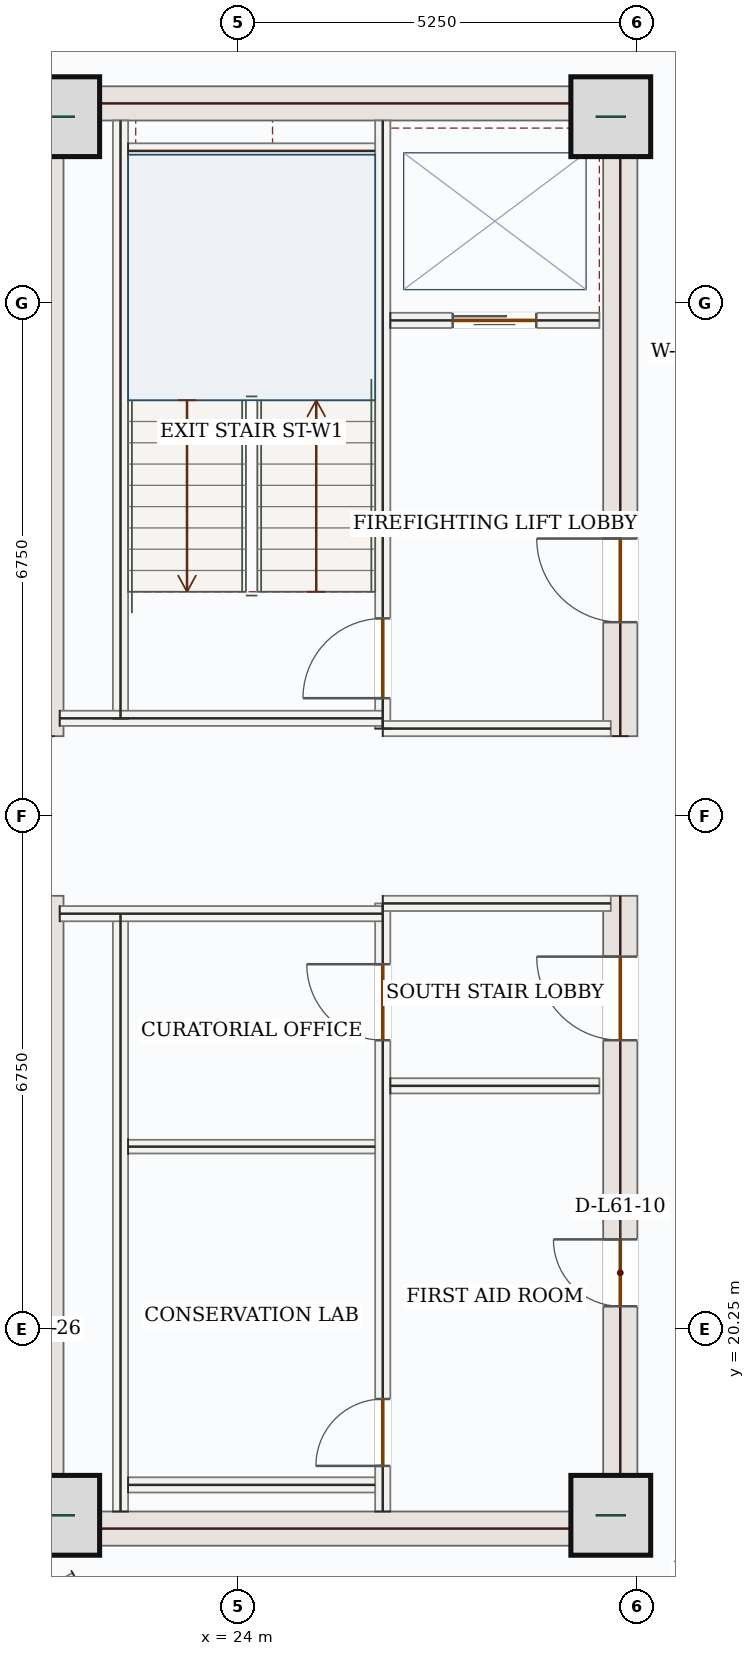
"""IFC4 building model, lengths in metres.
Left out: names, types, materials, properties, quantities, classifications, styles, units other than length and angle.
Written with IfcOpenShell. Run it as: python <this file> out.ifc"""

import sys

from ifc_helpers import new_model, si_unit, direction, frame, frame_2d, origin, origin_2d, place, context, subcontext, project, spatial, rectangle, extrude, source, transform, mapped, element, fill, save


model = new_model("IFC4")
c1 = context("Model", 3, precision=1e-05, world=origin(), true_north=direction((0.0, 1.0)))
c2 = subcontext(c1, "Body", "Model", "MODEL_VIEW")
j1 = project(units=[si_unit("LENGTHUNIT", "METRE"), si_unit("PLANEANGLEUNIT", "RADIAN")], contexts=[c1])
p1 = place(None, origin())
s1 = spatial("IfcSite", under=j1, at=p1, CompositionType="ELEMENT")
p2 = place(p1, origin())
s2 = spatial("IfcBuilding", under=s1, at=p2, CompositionType="ELEMENT")
p3 = place(p2, frame((0.0, 0.0, 257.85)))
s3 = spatial("IfcBuildingStorey", under=s2, at=p3, CompositionType="ELEMENT", Elevation=257.85)
m1 = source(origin(), c2, "Body", "SweptSolid", [
    extrude(rectangle(XDim=8.55, YDim=0.45, at=frame_2d((4.275, 0.0))), origin(), (0.0, 0.0, 1.0), 3.5),
])
for number, where, z_axis, x_axis in (
    (1, (21.475, 17.4, 0.0), (0.0, 0.0, 1.0), (0.0, 1.0, 0.0)),
    (2, (21.475, 28.05, 0.0), (0.0, 0.0, 1.0), (0.0, 1.0, 0.0)),
):
    element("IfcWall", number, at=place(p3, frame(where, z_axis=z_axis, x_axis=x_axis)), inside=s3, PredefinedType="SHEAR", context=c2, shape_type="MappedRepresentation", body=[
        mapped(m1, transform((0.0, 0.0, 0.0), x_axis=(1.0, 0.0, 0.0), y_axis=(0.0, 1.0, 0.0), z_axis=(0.0, 0.0, 1.0), scale=1.0)),
    ])
p4 = place(p3, frame((29.025, 17.4, 0.0), z_axis=(0.0, 0.0, 1.0), x_axis=(0.0, 1.0, 0.0)))
e3 = element("IfcWall", 3, at=p4, inside=s3, PredefinedType="SHEAR", context=c2, shape_type="SweptSolid", body=[
    extrude(rectangle(XDim=8.55, YDim=0.45, at=frame_2d((4.275, 0.0))), origin(), (0.0, 0.0, 1.0), 3.5),
])
p5 = place(p4, frame((6.65, 0.0, 0.0)))
e4 = element("IfcOpeningElement", 4, at=p5, cuts=e3, PredefinedType="OPENING", context=c2, shape_type="SweptSolid", body=[
    extrude(rectangle(XDim=1.1, YDim=2.2, at=frame_2d((0.55, 1.1))), frame((0.0, 0.235, 0.0), z_axis=(0.0, -1.0, 0.0), x_axis=(1.0, 0.0, 0.0)), (0.0, 0.0, 1.0), 0.47),
])
p6 = place(p4, frame((3.15, 0.0, 0.0)))
e5 = element("IfcOpeningElement", 5, at=p6, cuts=e3, PredefinedType="OPENING", context=c2, shape_type="SweptSolid", body=[
    extrude(rectangle(XDim=0.88, YDim=2.1, at=frame_2d((0.44, 1.05))), frame((0.0, 0.235, 0.0), z_axis=(0.0, -1.0, 0.0), x_axis=(1.0, 0.0, 0.0)), (0.0, 0.0, 1.0), 0.47),
])
p7 = place(p3, frame((29.025, 28.05, 0.0), z_axis=(0.0, 0.0, 1.0), x_axis=(0.0, 1.0, 0.0)))
e6 = element("IfcWall", 6, at=p7, inside=s3, PredefinedType="SHEAR", context=c2, shape_type="SweptSolid", body=[
    extrude(rectangle(XDim=8.55, YDim=0.45, at=frame_2d((4.275, 0.0))), origin(), (0.0, 0.0, 1.0), 3.5),
])
p8 = place(p7, frame((1.5, 0.0, 0.0)))
e7 = element("IfcOpeningElement", 7, at=p8, cuts=e6, PredefinedType="OPENING", context=c2, shape_type="SweptSolid", body=[
    extrude(rectangle(XDim=1.1, YDim=2.2, at=frame_2d((0.55, 1.1))), frame((0.0, 0.235, 0.0), z_axis=(0.0, -1.0, 0.0), x_axis=(1.0, 0.0, 0.0)), (0.0, 0.0, 1.0), 0.47),
])
m2 = source(origin(), c2, "Body", "SweptSolid", [
    extrude(rectangle(XDim=7.1, YDim=0.45, at=frame_2d((3.55, 0.0))), origin(), (0.0, 0.0, 1.0), 3.5),
])
for number, where, z_axis, x_axis in (
    (8, (21.7, 17.625, 0.0), (0.0, 0.0, 1.0), (1.0, 0.0, 0.0)),
    (9, (21.7, 36.375, 0.0), (0.0, 0.0, 1.0), (1.0, 0.0, 0.0)),
):
    element("IfcWall", number, at=place(p3, frame(where, z_axis=z_axis, x_axis=x_axis)), inside=s3, PredefinedType="SHEAR", context=c2, shape_type="MappedRepresentation", body=[
        mapped(m2, transform((0.0, 0.0, 0.0), x_axis=(1.0, 0.0, 0.0), y_axis=(0.0, 1.0, 0.0), z_axis=(0.0, 0.0, 1.0), scale=1.0)),
    ])
m3 = source(origin(), c2, "Body", "SweptSolid", [
    extrude(rectangle(XDim=1.05, YDim=1.05, at=origin_2d()), origin(), (0.0, 0.0, 1.0), 3.75),
])
for number, where, z_axis, x_axis in (
    (10, (21.65, 17.8, 0.0), (0.0, 0.0, 1.0), (1.0, 0.0, 0.0)),
    (11, (28.9, 17.8, 0.0), (0.0, 0.0, 1.0), (1.0, 0.0, 0.0)),
    (12, (21.65, 36.2, 0.0), (0.0, 0.0, 1.0), (1.0, 0.0, 0.0)),
    (13, (28.9, 36.2, 0.0), (0.0, 0.0, 1.0), (1.0, 0.0, 0.0)),
):
    element("IfcColumn", number, at=place(p3, frame(where, z_axis=z_axis, x_axis=x_axis)), inside=s3, PredefinedType="COLUMN", context=c2, shape_type="MappedRepresentation", body=[
        mapped(m3, transform((0.0, 0.0, 0.0), x_axis=(1.0, 0.0, 0.0), y_axis=(0.0, 1.0, 0.0), z_axis=(0.0, 0.0, 1.0), scale=1.0)),
    ])
m4 = source(origin(), c2, "Body", "SweptSolid", [
    extrude(rectangle(XDim=4.394, YDim=0.28, at=frame_2d((2.197, 0.0))), origin(), (0.0, 0.0, 1.0), 3.5),
])
p9 = place(p3, frame((18.94, 35.542, 0.0), z_axis=(0.0, 0.0, 1.0), x_axis=(0.707106781187, 0.707106781187, 0.0)))
e14 = element("IfcWall", 14, at=p9, inside=s3, PredefinedType="SOLIDWALL", context=c2, shape_type="MappedRepresentation", body=[
    mapped(m4, transform((0.0, 0.0, 0.0), x_axis=(1.0, 0.0, 0.0), y_axis=(0.0, 1.0, 0.0), z_axis=(0.0, 0.0, 1.0), scale=1.0)),
])
m5 = source(origin(), c2, "Body", "SweptSolid", [
    extrude(rectangle(XDim=7.87, YDim=0.2, at=frame_2d((3.935, 0.0))), origin(), (0.0, 0.0, 1.0), 3.5),
])
for number, where, z_axis, x_axis in (
    (15, (22.45, 17.85, 0.0), (0.0, 0.0, 1.0), (0.0, 1.0, 0.0)),
    (16, (22.45, 28.28, 0.0), (0.0, 0.0, 1.0), (0.0, 1.0, 0.0)),
):
    element("IfcWall", number, at=place(p3, frame(where, z_axis=z_axis, x_axis=x_axis)), inside=s3, PredefinedType="SOLIDWALL", context=c2, shape_type="MappedRepresentation", body=[
        mapped(m5, transform((0.0, 0.0, 0.0), x_axis=(1.0, 0.0, 0.0), y_axis=(0.0, 1.0, 0.0), z_axis=(0.0, 0.0, 1.0), scale=1.0)),
    ])
p10 = place(p3, frame((25.9, 17.85, 0.0), z_axis=(0.0, 0.0, 1.0), x_axis=(0.0, 1.0, 0.0)))
e17 = element("IfcWall", 17, at=p10, inside=s3, PredefinedType="SOLIDWALL", context=c2, shape_type="SweptSolid", body=[
    extrude(rectangle(XDim=8.0, YDim=0.2, at=frame_2d((4.0, 0.0))), origin(), (0.0, 0.0, 1.0), 3.5),
])
p11 = place(p10, frame((6.2, 0.0, 0.0)))
e18 = element("IfcOpeningElement", 18, at=p11, cuts=e17, PredefinedType="OPENING", context=c2, shape_type="SweptSolid", body=[
    extrude(rectangle(XDim=1.0, YDim=2.15, at=frame_2d((0.5, 1.075))), frame((0.0, 0.11, 0.0), z_axis=(0.0, -1.0, 0.0), x_axis=(1.0, 0.0, 0.0)), (0.0, 0.0, 1.0), 0.22),
])
p12 = place(p10, frame((0.6, 0.0, 0.0)))
e19 = element("IfcOpeningElement", 19, at=p12, cuts=e17, PredefinedType="OPENING", context=c2, shape_type="SweptSolid", body=[
    extrude(rectangle(XDim=0.88, YDim=2.1, at=frame_2d((0.44, 1.05))), frame((0.0, 0.11, 0.0), z_axis=(0.0, -1.0, 0.0), x_axis=(1.0, 0.0, 0.0)), (0.0, 0.0, 1.0), 0.22),
])
p13 = place(p3, frame((25.9, 28.15, 0.0), z_axis=(0.0, 0.0, 1.0), x_axis=(0.0, 1.0, 0.0)))
e20 = element("IfcWall", 20, at=p13, inside=s3, PredefinedType="SOLIDWALL", context=c2, shape_type="SweptSolid", body=[
    extrude(rectangle(XDim=8.0, YDim=0.2, at=frame_2d((4.0, 0.0))), origin(), (0.0, 0.0, 1.0), 3.5),
])
p14 = place(p13, frame((0.4, 0.0, 0.0)))
e21 = element("IfcOpeningElement", 21, at=p14, cuts=e20, PredefinedType="OPENING", context=c2, shape_type="SweptSolid", body=[
    extrude(rectangle(XDim=1.05, YDim=2.15, at=frame_2d((0.525, 1.075))), frame((0.0, 0.11, 0.0), z_axis=(0.0, -1.0, 0.0), x_axis=(1.0, 0.0, 0.0)), (0.0, 0.0, 1.0), 0.22),
])
m6 = source(origin(), c2, "Body", "SweptSolid", [
    extrude(rectangle(XDim=4.25, YDim=0.2, at=frame_2d((2.125, 0.0))), origin(), (0.0, 0.0, 1.0), 3.5),
])
p15 = place(p3, frame((21.65, 25.715, 0.0), z_axis=(0.0, 0.0, 1.0), x_axis=(1.0, 0.0, 0.0)))
e22 = element("IfcWall", 22, at=p15, inside=s3, PredefinedType="SOLIDWALL", context=c2, shape_type="MappedRepresentation", body=[
    mapped(m6, transform((0.0, 0.0, 0.0), x_axis=(1.0, 0.0, 0.0), y_axis=(0.0, 1.0, 0.0), z_axis=(0.0, 0.0, 1.0), scale=1.0)),
])
m7 = source(origin(), c2, "Body", "SweptSolid", [
    extrude(rectangle(XDim=3.0, YDim=0.2, at=frame_2d((1.5, 0.0))), origin(), (0.0, 0.0, 1.0), 3.5),
])
p16 = place(p3, frame((25.9, 25.85, 0.0), z_axis=(0.0, 0.0, 1.0), x_axis=(1.0, 0.0, 0.0)))
e23 = element("IfcWall", 23, at=p16, inside=s3, PredefinedType="SOLIDWALL", context=c2, shape_type="MappedRepresentation", body=[
    mapped(m7, transform((0.0, 0.0, 0.0), x_axis=(1.0, 0.0, 0.0), y_axis=(0.0, 1.0, 0.0), z_axis=(0.0, 0.0, 1.0), scale=1.0)),
])
p17 = place(p3, frame((21.65, 28.285, 0.0), z_axis=(0.0, 0.0, 1.0), x_axis=(1.0, 0.0, 0.0)))
e24 = element("IfcWall", 24, at=p17, inside=s3, PredefinedType="SOLIDWALL", context=c2, shape_type="MappedRepresentation", body=[
    mapped(m6, transform((0.0, 0.0, 0.0), x_axis=(1.0, 0.0, 0.0), y_axis=(0.0, 1.0, 0.0), z_axis=(0.0, 0.0, 1.0), scale=1.0)),
])
p18 = place(p3, frame((25.9, 28.15, 0.0), z_axis=(0.0, 0.0, 1.0), x_axis=(1.0, 0.0, 0.0)))
e25 = element("IfcWall", 25, at=p18, inside=s3, PredefinedType="SOLIDWALL", context=c2, shape_type="MappedRepresentation", body=[
    mapped(m7, transform((0.0, 0.0, 0.0), x_axis=(1.0, 0.0, 0.0), y_axis=(0.0, 1.0, 0.0), z_axis=(0.0, 0.0, 1.0), scale=1.0)),
])
m8 = source(origin(), c2, "Body", "SweptSolid", [
    extrude(rectangle(XDim=3.25, YDim=0.2, at=frame_2d((1.625, 0.0))), origin(), (0.0, 0.0, 1.0), 3.5),
])
for number, where, z_axis, x_axis in (
    (26, (22.55, 35.75, 0.0), (0.0, 0.0, 1.0), (1.0, 0.0, 0.0)),
    (27, (22.55, 18.2, 0.0), (0.0, 0.0, 1.0), (1.0, 0.0, 0.0)),
):
    element("IfcWall", number, at=place(p3, frame(where, z_axis=z_axis, x_axis=x_axis)), inside=s3, PredefinedType="SOLIDWALL", context=c2, shape_type="MappedRepresentation", body=[
        mapped(m8, transform((0.0, 0.0, 0.0), x_axis=(1.0, 0.0, 0.0), y_axis=(0.0, 1.0, 0.0), z_axis=(0.0, 0.0, 1.0), scale=1.0)),
    ])
m9 = source(origin(), c2, "Body", "SweptSolid", [
    extrude(rectangle(XDim=3.25, YDim=0.18, at=frame_2d((1.625, 0.0))), origin(), (0.0, 0.0, 1.0), 3.5),
])
p19 = place(p3, frame((22.55, 22.65, 0.0), z_axis=(0.0, 0.0, 1.0), x_axis=(1.0, 0.0, 0.0)))
e28 = element("IfcWall", 28, at=p19, inside=s3, PredefinedType="PARTITIONING", context=c2, shape_type="MappedRepresentation", body=[
    mapped(m9, transform((0.0, 0.0, 0.0), x_axis=(1.0, 0.0, 0.0), y_axis=(0.0, 1.0, 0.0), z_axis=(0.0, 0.0, 1.0), scale=1.0)),
])
p20 = place(p3, frame((26.0, 33.52, 0.0), z_axis=(0.0, 0.0, 1.0), x_axis=(1.0, 0.0, 0.0)))
e29 = element("IfcWall", 29, at=p20, inside=s3, PredefinedType="SOLIDWALL", context=c2, shape_type="SweptSolid", body=[
    extrude(rectangle(XDim=2.75, YDim=0.2, at=frame_2d((1.375, 0.0))), origin(), (0.0, 0.0, 1.0), 3.5),
])
p21 = place(p20, frame((0.82, 0.0, 0.0)))
e30 = element("IfcOpeningElement", 30, at=p21, cuts=e29, PredefinedType="OPENING", context=c2, shape_type="SweptSolid", body=[
    extrude(rectangle(XDim=1.1, YDim=2.15, at=frame_2d((0.55, 1.075))), frame((0.0, 0.11, 0.0), z_axis=(0.0, -1.0, 0.0), x_axis=(1.0, 0.0, 0.0)), (0.0, 0.0, 1.0), 0.22),
])
m10 = source(origin(), c2, "Body", "SweptSolid", [
    extrude(rectangle(XDim=2.75, YDim=0.2, at=frame_2d((1.375, 0.0))), origin(), (0.0, 0.0, 1.0), 3.5),
])
p22 = place(p3, frame((26.0, 23.45, 0.0), z_axis=(0.0, 0.0, 1.0), x_axis=(1.0, 0.0, 0.0)))
e31 = element("IfcWall", 31, at=p22, inside=s3, PredefinedType="SOLIDWALL", context=c2, shape_type="MappedRepresentation", body=[
    mapped(m10, transform((0.0, 0.0, 0.0), x_axis=(1.0, 0.0, 0.0), y_axis=(0.0, 1.0, 0.0), z_axis=(0.0, 0.0, 1.0), scale=1.0)),
])
m11 = source(origin(), c2, "Body", "SweptSolid", [
    extrude(rectangle(XDim=4.695, YDim=0.14, at=frame_2d((2.348, 0.0))), origin(), (0.0, 0.0, 1.0), 3.5),
])
p23 = place(p3, frame((21.852, 16.98, 0.0), z_axis=(0.0, 0.0, 1.0), x_axis=(-0.877559526902, -0.479467701461, 0.0)))
e32 = element("IfcWall", 32, at=p23, inside=s3, PredefinedType="PARTITIONING", context=c2, shape_type="MappedRepresentation", body=[
    mapped(m11, transform((0.0, 0.0, 0.0), x_axis=(1.0, 0.0, 0.0), y_axis=(0.0, 1.0, 0.0), z_axis=(0.0, 0.0, 1.0), scale=1.0)),
])
m12 = source(origin(), c2, "Body", "SweptSolid", [
    extrude(rectangle(XDim=1.05, YDim=2.15, at=frame_2d((0.525, 1.075))), frame((0.0, 0.025, 0.0), z_axis=(0.0, -1.0, 0.0), x_axis=(1.0, 0.0, 0.0)), (0.0, 0.0, 1.0), 0.05),
])
p24 = place(p14, origin())
e33 = element("IfcDoor", 33, at=p24, inside=s3, OperationType="SINGLE_SWING_LEFT", PredefinedType="DOOR", context=c2, shape_type="MappedRepresentation", body=[
    mapped(m12, transform((0.0, 0.0, 0.0), x_axis=(1.0, 0.0, 0.0), y_axis=(0.0, 1.0, 0.0), z_axis=(0.0, 0.0, 1.0), scale=1.0)),
])
fill(e21, e33)
m13 = source(origin(), c2, "Body", "SweptSolid", [
    extrude(rectangle(XDim=1.0, YDim=2.15, at=frame_2d((0.5, 1.075))), frame((0.0, 0.025, 0.0), z_axis=(0.0, -1.0, 0.0), x_axis=(1.0, 0.0, 0.0)), (0.0, 0.0, 1.0), 0.05),
])
p25 = place(p11, origin())
e34 = element("IfcDoor", 34, at=p25, inside=s3, OperationType="SINGLE_SWING_RIGHT", PredefinedType="DOOR", context=c2, shape_type="MappedRepresentation", body=[
    mapped(m13, transform((0.0, 0.0, 0.0), x_axis=(1.0, 0.0, 0.0), y_axis=(0.0, 1.0, 0.0), z_axis=(0.0, 0.0, 1.0), scale=1.0)),
])
fill(e18, e34)
m14 = source(origin(), c2, "Body", "SweptSolid", [
    extrude(rectangle(XDim=0.88, YDim=2.1, at=frame_2d((0.44, 1.05))), frame((0.0, 0.025, 0.0), z_axis=(0.0, -1.0, 0.0), x_axis=(1.0, 0.0, 0.0)), (0.0, 0.0, 1.0), 0.05),
])
p26 = place(p12, origin())
e35 = element("IfcDoor", 35, at=p26, inside=s3, OperationType="SINGLE_SWING_LEFT", PredefinedType="DOOR", context=c2, shape_type="MappedRepresentation", body=[
    mapped(m14, transform((0.0, 0.0, 0.0), x_axis=(1.0, 0.0, 0.0), y_axis=(0.0, 1.0, 0.0), z_axis=(0.0, 0.0, 1.0), scale=1.0)),
])
fill(e19, e35)
m15 = source(origin(), c2, "Body", "SweptSolid", [
    extrude(rectangle(XDim=1.1, YDim=2.15, at=frame_2d((0.55, 1.075))), frame((0.0, 0.025, 0.0), z_axis=(0.0, -1.0, 0.0), x_axis=(1.0, 0.0, 0.0)), (0.0, 0.0, 1.0), 0.05),
])
p27 = place(p21, origin())
e36 = element("IfcDoor", 36, at=p27, inside=s3, OperationType="DOUBLE_DOOR_SLIDING", PredefinedType="DOOR", context=c2, shape_type="MappedRepresentation", body=[
    mapped(m15, transform((0.0, 0.0, 0.0), x_axis=(1.0, 0.0, 0.0), y_axis=(0.0, 1.0, 0.0), z_axis=(0.0, 0.0, 1.0), scale=1.0)),
])
fill(e30, e36)
m16 = source(origin(), c2, "Body", "SweptSolid", [
    extrude(rectangle(XDim=1.1, YDim=2.2, at=frame_2d((0.55, 1.1))), frame((0.0, 0.025, 0.0), z_axis=(0.0, -1.0, 0.0), x_axis=(1.0, 0.0, 0.0)), (0.0, 0.0, 1.0), 0.05),
])
p28 = place(p8, origin())
e37 = element("IfcDoor", 37, at=p28, inside=s3, OperationType="SINGLE_SWING_RIGHT", PredefinedType="DOOR", context=c2, shape_type="MappedRepresentation", body=[
    mapped(m16, transform((0.0, 0.0, 0.0), x_axis=(1.0, 0.0, 0.0), y_axis=(0.0, 1.0, 0.0), z_axis=(0.0, 0.0, 1.0), scale=1.0)),
])
fill(e7, e37)
p29 = place(p5, origin())
e38 = element("IfcDoor", 38, at=p29, inside=s3, OperationType="SINGLE_SWING_RIGHT", PredefinedType="DOOR", context=c2, shape_type="MappedRepresentation", body=[
    mapped(m16, transform((0.0, 0.0, 0.0), x_axis=(1.0, 0.0, 0.0), y_axis=(0.0, 1.0, 0.0), z_axis=(0.0, 0.0, 1.0), scale=1.0)),
])
fill(e4, e38)
p30 = place(p6, origin())
e39 = element("IfcDoor", 39, at=p30, inside=s3, OperationType="SINGLE_SWING_RIGHT", PredefinedType="DOOR", context=c2, shape_type="MappedRepresentation", body=[
    mapped(m14, transform((0.0, 0.0, 0.0), x_axis=(1.0, 0.0, 0.0), y_axis=(0.0, 1.0, 0.0), z_axis=(0.0, 0.0, 1.0), scale=1.0)),
])
fill(e5, e39)
save(model, sys.argv[1])
